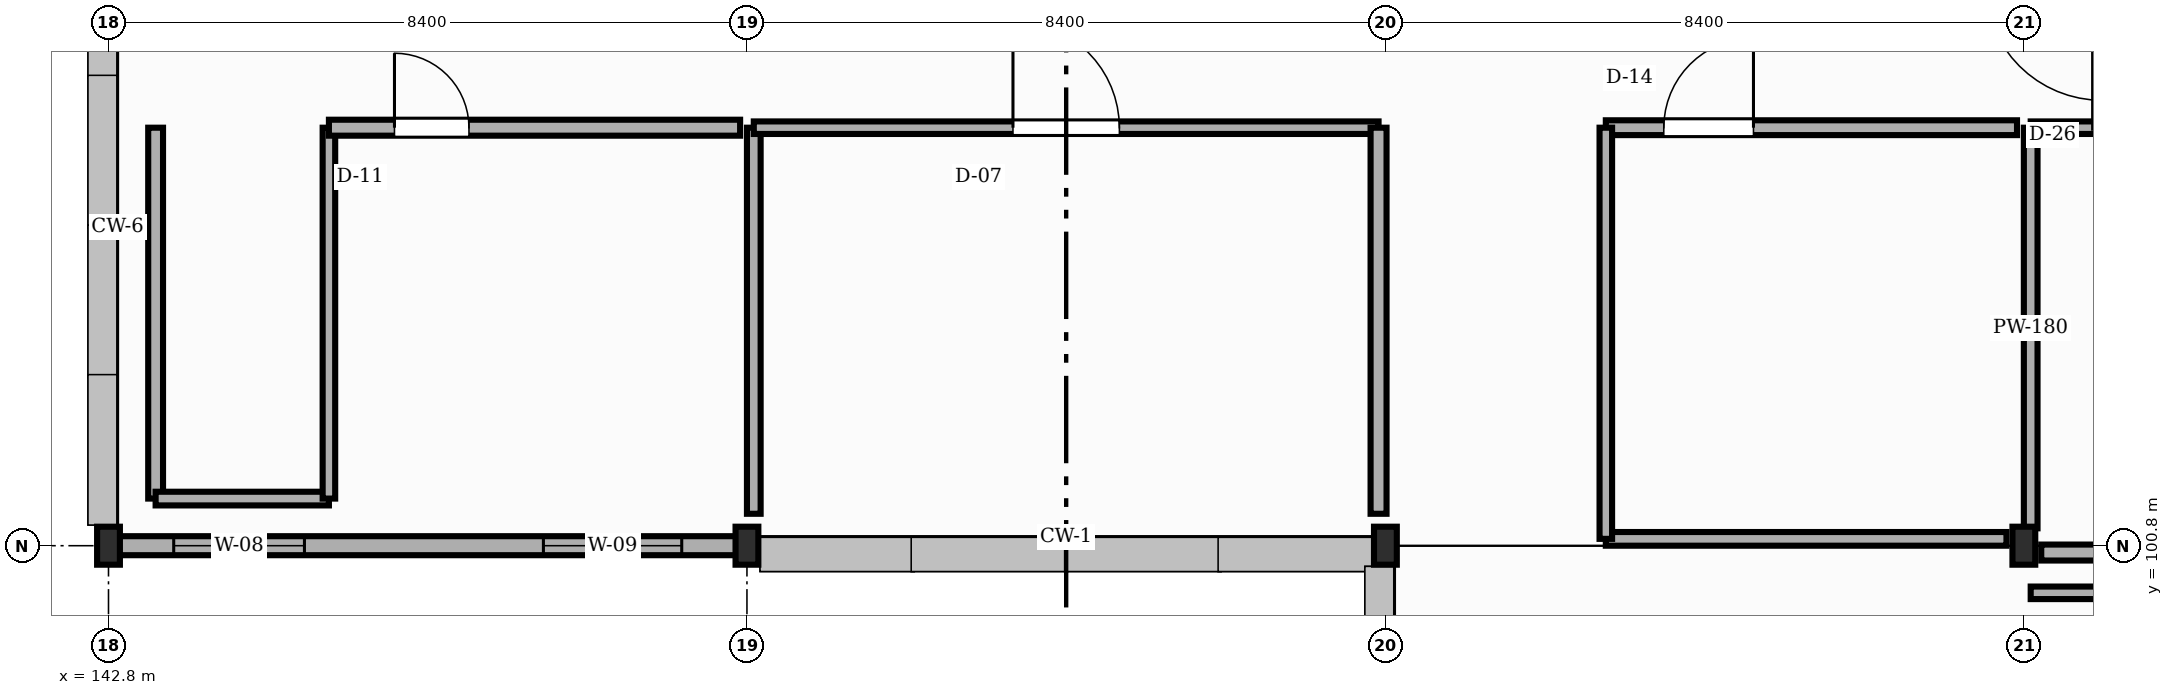
"""IFC4 building model, lengths in metres.
Left out: names, types, materials, properties, quantities, classifications, styles, units other than length and angle.
Written with IfcOpenShell. Run it as: python <this file> out.ifc"""

import sys

from ifc_helpers import new_model, si_unit, direction, frame, frame_2d, origin, origin_2d, place, context, subcontext, project, spatial, rectangle, i_section, extrude, element, fill, save


model = new_model("IFC4")
c1 = context("Model", 3, precision=1e-05, world=origin(), true_north=direction((0.0, 1.0)))
c2 = subcontext(c1, "Body", "Model", "MODEL_VIEW")
j1 = project(units=[si_unit("LENGTHUNIT", "METRE"), si_unit("PLANEANGLEUNIT", "RADIAN")], contexts=[c1])
p1 = place(None, origin())
s1 = spatial("IfcSite", under=j1, at=p1, CompositionType="ELEMENT")
p2 = place(p1, origin())
s2 = spatial("IfcBuilding", under=s1, at=p2, CompositionType="ELEMENT")
p3 = place(p2, frame((0.0, 0.0, 13.95)))
s3 = spatial("IfcBuildingStorey", under=s2, at=p3, CompositionType="ELEMENT", Elevation=13.95)
for number, where, z_axis, x_axis in (
    (1, (142.8, 100.8, 0.0), (0.0, 0.0, 1.0), (1.0, 0.0, 0.0)),
    (2, (151.2, 100.8, 0.0), (0.0, 0.0, 1.0), (1.0, 0.0, 0.0)),
    (3, (159.6, 100.8, 0.0), (0.0, 0.0, 1.0), (1.0, 0.0, 0.0)),
    (4, (168.0, 100.8, 0.0), (0.0, 0.0, 1.0), (1.0, 0.0, 0.0)),
):
    element("IfcColumn", number, at=place(p3, frame(where, z_axis=z_axis, x_axis=x_axis)), inside=s3, PredefinedType="COLUMN", context=c2, shape_type="SweptSolid", body=[
        extrude(i_section(OverallWidth=0.3, OverallDepth=0.5, WebThickness=0.014, FlangeThickness=0.028, FilletRadius=0.027, at=origin_2d()), origin(), (0.0, 0.0, 1.0), 4.05),
    ])
p4 = place(p3, frame((142.808, 100.8, 0.0), z_axis=(0.0, 0.0, 1.0), x_axis=(1.0, 0.0, 0.0)))
e5 = element("IfcWall", 5, at=p4, inside=s3, PredefinedType="STANDARD", context=c2, shape_type="SweptSolid", body=[
    extrude(rectangle(XDim=8.384, YDim=0.25, at=frame_2d((4.192, 0.0))), origin(), (0.0, 0.0, 1.0), 3.517),
])
p5 = place(p4, frame((0.85, 0.0, 0.9)))
e6 = element("IfcOpeningElement", 6, at=p5, cuts=e5, PredefinedType="OPENING", context=c2, shape_type="SweptSolid", body=[
    extrude(rectangle(XDim=1.72, YDim=1.05, at=frame_2d((0.86, 0.525))), frame((0.0, 0.135, 0.0), z_axis=(0.0, -1.0, 0.0), x_axis=(1.0, 0.0, 0.0)), (0.0, 0.0, 1.0), 0.27),
])
p6 = place(p4, frame((5.714, 0.0, 0.9)))
e7 = element("IfcOpeningElement", 7, at=p6, cuts=e5, PredefinedType="OPENING", context=c2, shape_type="SweptSolid", body=[
    extrude(rectangle(XDim=1.82, YDim=1.05, at=frame_2d((0.91, 0.525))), frame((0.0, 0.135, 0.0), z_axis=(0.0, -1.0, 0.0), x_axis=(1.0, 0.0, 0.0)), (0.0, 0.0, 1.0), 0.27),
])
p7 = place(p3, frame((175.78, 100.18, -0.004), z_axis=(0.0, 0.0, 1.0), x_axis=(-1.0, 0.0, 0.0)))
e8 = element("IfcWall", 8, at=p7, inside=s3, PredefinedType="STANDARD", context=c2, shape_type="SweptSolid", body=[
    extrude(rectangle(XDim=7.69, YDim=0.165, at=frame_2d((3.845, 0.0))), origin(), (0.0, 0.0, 1.0), 3.854),
])
p8 = place(p3, frame((168.229, 100.71, -0.004), z_axis=(0.0, 0.0, 1.0), x_axis=(1.0, 0.0, 0.0)))
e9 = element("IfcWall", 9, at=p8, inside=s3, PredefinedType="STANDARD", context=c2, shape_type="SweptSolid", body=[
    extrude(rectangle(XDim=7.751, YDim=0.21, at=frame_2d((3.875, 0.0))), origin(), (0.0, 0.0, 1.0), 3.251),
])
p9 = place(p3, frame((168.09, 101.029, -0.004), z_axis=(0.0, 0.0, 1.0), x_axis=(0.0, 1.0, 0.0)))
e10 = element("IfcWall", 10, at=p9, inside=s3, PredefinedType="STANDARD", context=c2, shape_type="SweptSolid", body=[
    extrude(rectangle(XDim=5.271, YDim=0.18, at=frame_2d((2.636, 0.0))), origin(), (0.0, 0.0, 1.0), 3.451),
])
p10 = place(p3, frame((168.09, 106.3, -0.004), z_axis=(0.0, 0.0, 1.0), x_axis=(1.0, 0.0, 0.0)))
e11 = element("IfcWall", 11, at=p10, inside=s3, PredefinedType="STANDARD", context=c2, shape_type="SweptSolid", body=[
    extrude(rectangle(XDim=0.94, YDim=0.165, at=frame_2d((0.47, 0.0))), origin(), (0.0, 0.0, 1.0), 3.854),
])
p11 = place(p3, frame((151.29, 101.22, -0.004), z_axis=(0.0, 0.0, 1.0), x_axis=(0.0, 1.0, 0.0)))
e12 = element("IfcWall", 12, at=p11, inside=s3, PredefinedType="STANDARD", context=c2, shape_type="SweptSolid", body=[
    extrude(rectangle(XDim=5.08, YDim=0.18, at=frame_2d((2.54, 0.0))), origin(), (0.0, 0.0, 1.0), 3.251),
])
p12 = place(p3, frame((151.29, 106.3, -0.004), z_axis=(0.0, 0.0, 1.0), x_axis=(1.0, 0.0, 0.0)))
e13 = element("IfcWall", 13, at=p12, inside=s3, PredefinedType="STANDARD", context=c2, shape_type="SweptSolid", body=[
    extrude(rectangle(XDim=8.22, YDim=0.165, at=frame_2d((4.11, 0.0))), origin(), (0.0, 0.0, 1.0), 3.854),
])
p13 = place(p12, frame((3.41, 0.0, 0.0)))
e14 = element("IfcOpeningElement", 14, at=p13, cuts=e13, PredefinedType="OPENING", context=c2, shape_type="SweptSolid", body=[
    extrude(rectangle(XDim=1.4, YDim=2.06, at=frame_2d((0.7, 1.03))), frame((0.0, 0.093, 0.0), z_axis=(0.0, -1.0, 0.0), x_axis=(1.0, 0.0, 0.0)), (0.0, 0.0, 1.0), 0.185),
])
p14 = place(p3, frame((159.51, 106.3, -0.004), z_axis=(0.0, 0.0, 1.0), x_axis=(0.0, -1.0, 0.0)))
e15 = element("IfcWall", 15, at=p14, inside=s3, PredefinedType="STANDARD", context=c2, shape_type="SweptSolid", body=[
    extrude(rectangle(XDim=5.08, YDim=0.21, at=frame_2d((2.54, 0.0))), origin(), (0.0, 0.0, 1.0), 3.361),
])
p15 = place(p3, frame((143.42, 106.3, -0.004), z_axis=(0.0, 0.0, 1.0), x_axis=(0.0, -1.0, 0.0)))
e16 = element("IfcWall", 16, at=p15, inside=s3, PredefinedType="STANDARD", context=c2, shape_type="SweptSolid", body=[
    extrude(rectangle(XDim=4.88, YDim=0.195, at=frame_2d((2.44, 0.0))), origin(), (0.0, 0.0, 1.0), 3.854),
])
p16 = place(p3, frame((143.42, 101.42, -0.004), z_axis=(0.0, 0.0, 1.0), x_axis=(1.0, 0.0, 0.0)))
e17 = element("IfcWall", 17, at=p16, inside=s3, PredefinedType="STANDARD", context=c2, shape_type="SweptSolid", body=[
    extrude(rectangle(XDim=2.28, YDim=0.18, at=frame_2d((1.14, 0.0))), origin(), (0.0, 0.0, 1.0), 3.854),
])
p17 = place(p3, frame((145.7, 101.42, -0.004), z_axis=(0.0, 0.0, 1.0), x_axis=(0.0, 1.0, 0.0)))
e18 = element("IfcWall", 18, at=p17, inside=s3, PredefinedType="STANDARD", context=c2, shape_type="SweptSolid", body=[
    extrude(rectangle(XDim=4.88, YDim=0.165, at=frame_2d((2.44, 0.0))), origin(), (0.0, 0.0, 1.0), 3.611),
])
p18 = place(p3, frame((145.7, 106.3, -0.004), z_axis=(0.0, 0.0, 1.0), x_axis=(1.0, 0.0, 0.0)))
e19 = element("IfcWall", 19, at=p18, inside=s3, PredefinedType="STANDARD", context=c2, shape_type="SweptSolid", body=[
    extrude(rectangle(XDim=5.41, YDim=0.21, at=frame_2d((2.705, 0.0))), origin(), (0.0, 0.0, 1.0), 3.854),
])
p19 = place(p18, frame((0.863, 0.0, 0.0)))
e20 = element("IfcOpeningElement", 20, at=p19, cuts=e19, PredefinedType="OPENING", context=c2, shape_type="SweptSolid", body=[
    extrude(rectangle(XDim=0.98, YDim=2.14, at=frame_2d((0.49, 1.07))), frame((0.0, 0.115, 0.0), z_axis=(0.0, -1.0, 0.0), x_axis=(1.0, 0.0, 0.0)), (0.0, 0.0, 1.0), 0.23),
])
p20 = place(p3, frame((162.5, 106.3, -0.004), z_axis=(0.0, 0.0, 1.0), x_axis=(1.0, 0.0, 0.0)))
e21 = element("IfcWall", 21, at=p20, inside=s3, PredefinedType="STANDARD", context=c2, shape_type="SweptSolid", body=[
    extrude(rectangle(XDim=5.41, YDim=0.195, at=frame_2d((2.705, 0.0))), origin(), (0.0, 0.0, 1.0), 3.854),
])
p21 = place(p20, frame((0.762, 0.0, 0.0)))
e22 = element("IfcOpeningElement", 22, at=p21, cuts=e21, PredefinedType="OPENING", context=c2, shape_type="SweptSolid", body=[
    extrude(rectangle(XDim=1.18, YDim=2.14, at=frame_2d((0.59, 1.07))), frame((0.0, 0.107, 0.0), z_axis=(0.0, -1.0, 0.0), x_axis=(1.0, 0.0, 0.0)), (0.0, 0.0, 1.0), 0.215),
])
p22 = place(p3, frame((167.771, 100.89, -0.004), z_axis=(0.0, 0.0, 1.0), x_axis=(-1.0, 0.0, 0.0)))
e23 = element("IfcWall", 23, at=p22, inside=s3, PredefinedType="STANDARD", context=c2, shape_type="SweptSolid", body=[
    extrude(rectangle(XDim=5.271, YDim=0.18, at=frame_2d((2.636, 0.0))), origin(), (0.0, 0.0, 1.0), 3.506),
])
p23 = place(p3, frame((162.5, 100.89, -0.004), z_axis=(0.0, 0.0, 1.0), x_axis=(0.0, 1.0, 0.0)))
e24 = element("IfcWall", 24, at=p23, inside=s3, PredefinedType="STANDARD", context=c2, shape_type="SweptSolid", body=[
    extrude(rectangle(XDim=5.41, YDim=0.165, at=frame_2d((2.705, 0.0))), origin(), (0.0, 0.0, 1.0), 3.551),
])
p24 = place(p5, origin())
e25 = element("IfcWindow", 25, at=p24, inside=s3, PartitioningType="SINGLE_PANEL", PredefinedType="WINDOW", context=c2, shape_type="SweptSolid", body=[
    extrude(rectangle(XDim=1.72, YDim=1.05, at=frame_2d((0.86, 0.525))), frame((0.0, 0.03, 0.0), z_axis=(0.0, -1.0, 0.0), x_axis=(1.0, 0.0, 0.0)), (0.0, 0.0, 1.0), 0.06),
])
fill(e6, e25)
p25 = place(p6, origin())
e26 = element("IfcWindow", 26, at=p25, inside=s3, PartitioningType="SINGLE_PANEL", PredefinedType="WINDOW", context=c2, shape_type="SweptSolid", body=[
    extrude(rectangle(XDim=1.82, YDim=1.05, at=frame_2d((0.91, 0.525))), frame((0.0, 0.03, 0.0), z_axis=(0.0, -1.0, 0.0), x_axis=(1.0, 0.0, 0.0)), (0.0, 0.0, 1.0), 0.06),
])
fill(e7, e26)
p26 = place(p13, origin())
e27 = element("IfcDoor", 27, at=p26, inside=s3, OperationType="SINGLE_SWING_LEFT", PredefinedType="DOOR", context=c2, shape_type="SweptSolid", body=[
    extrude(rectangle(XDim=1.4, YDim=2.06, at=frame_2d((0.7, 1.03))), frame((0.0, 0.025, 0.0), z_axis=(0.0, -1.0, 0.0), x_axis=(1.0, 0.0, 0.0)), (0.0, 0.0, 1.0), 0.05),
])
fill(e14, e27)
p27 = place(p19, origin())
e28 = element("IfcDoor", 28, at=p27, inside=s3, OperationType="SINGLE_SWING_LEFT", PredefinedType="DOOR", context=c2, shape_type="SweptSolid", body=[
    extrude(rectangle(XDim=0.98, YDim=2.14, at=frame_2d((0.49, 1.07))), frame((0.0, 0.025, 0.0), z_axis=(0.0, -1.0, 0.0), x_axis=(1.0, 0.0, 0.0)), (0.0, 0.0, 1.0), 0.05),
])
fill(e20, e28)
p28 = place(p21, origin())
e29 = element("IfcDoor", 29, at=p28, inside=s3, OperationType="SINGLE_SWING_RIGHT", PredefinedType="DOOR", context=c2, shape_type="SweptSolid", body=[
    extrude(rectangle(XDim=1.18, YDim=2.14, at=frame_2d((0.59, 1.07))), frame((0.0, 0.025, 0.0), z_axis=(0.0, -1.0, 0.0), x_axis=(1.0, 0.0, 0.0)), (0.0, 0.0, 1.0), 0.05),
])
fill(e22, e29)
save(model, sys.argv[1])
